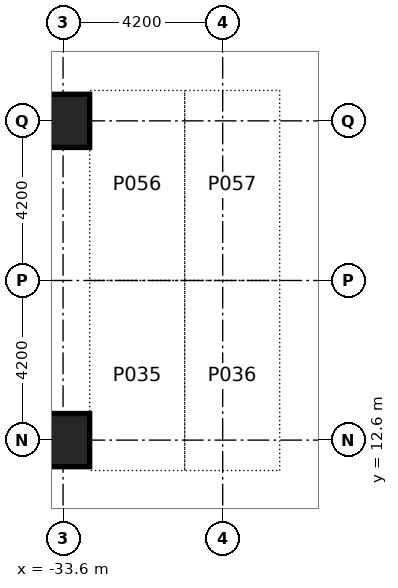
"""IFC4 building model, lengths in metres.
Left out: names, types, materials, properties, quantities, classifications, styles, units other than length and angle.
Written with IfcOpenShell. Run it as: python <this file> out.ifc"""

import sys

from ifc_helpers import new_model, si_unit, direction, frame, origin, origin_2d, place, context, subcontext, project, spatial, rectangle, extrude, element, save


model = new_model("IFC4")
c1 = context("Model", 3, precision=1e-05, world=origin(), true_north=direction((0.0, 1.0)))
c2 = subcontext(c1, "Body", "Model", "MODEL_VIEW")
j1 = project(units=[si_unit("LENGTHUNIT", "METRE"), si_unit("PLANEANGLEUNIT", "RADIAN")], contexts=[c1])
p1 = place(None, origin())
s1 = spatial("IfcSite", under=j1, at=p1, CompositionType="ELEMENT")
p2 = place(p1, origin())
s2 = spatial("IfcBuilding", under=s1, at=p2, CompositionType="ELEMENT")
p3 = place(p2, frame((0.0, 0.0, -4.2)))
s3 = spatial("IfcBuildingStorey", under=s2, at=p3, CompositionType="ELEMENT", Elevation=-4.2)
for number, where, z_axis, x_axis in (
    (1, (-33.6, 12.6, 0.0), (0.0, 0.0, 1.0), (1.0, 0.0, 0.0)),
    (2, (-33.6, 21.0, 0.0), (0.0, 0.0, 1.0), (1.0, 0.0, 0.0)),
):
    element("IfcColumn", number, at=place(p3, frame(where, z_axis=z_axis, x_axis=x_axis)), inside=s3, PredefinedType="COLUMN", context=c2, shape_type="SweptSolid", body=[
        extrude(rectangle(XDim=1.4, YDim=1.4, at=origin_2d()), origin(), (0.0, 0.0, 1.0), 4.2),
    ])
save(model, sys.argv[1])
